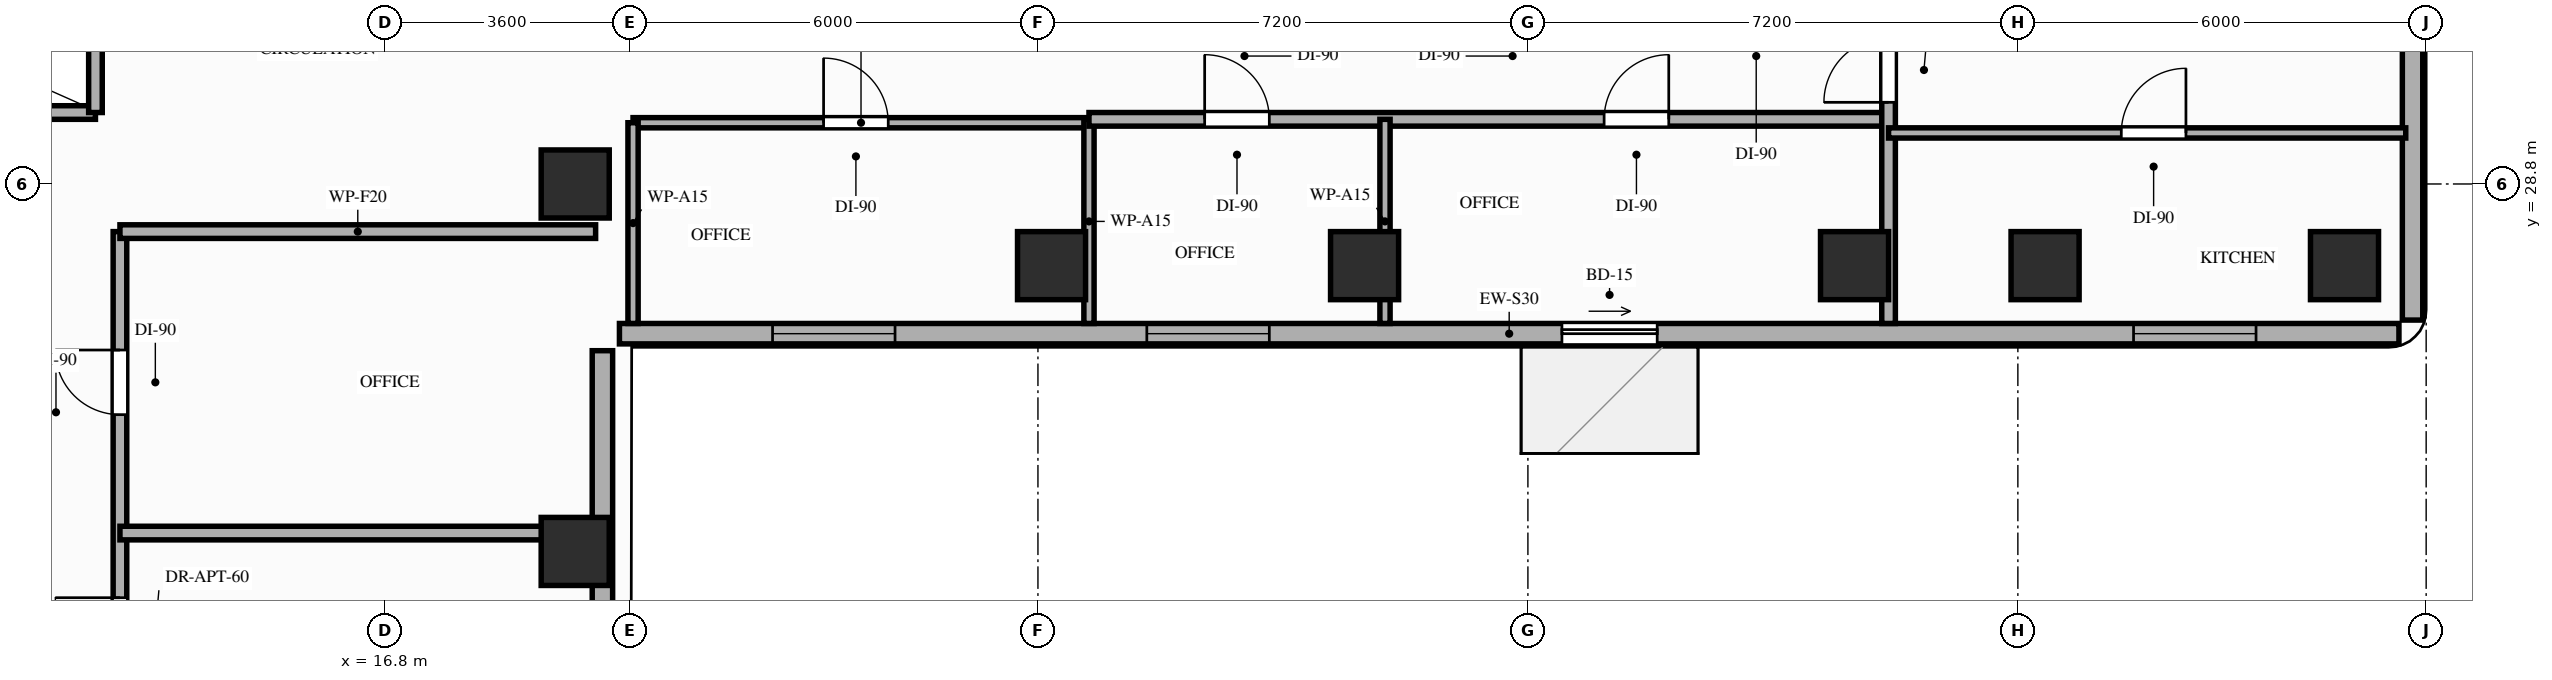
"""IFC4 building model, lengths in metres.
Left out: names, types, materials, properties, quantities, classifications, styles, units other than length and angle.
Written with IfcOpenShell. Run it as: python <this file> out.ifc"""

import sys

from ifc_helpers import new_model, si_unit, direction, frame, frame_2d, origin, origin_2d, place, context, subcontext, project, spatial, rectangle, extrude, element, fill, save


model = new_model("IFC4")
c1 = context("Model", 3, precision=1e-05, world=origin(), true_north=direction((0.0, 1.0)))
c2 = subcontext(c1, "Body", "Model", "MODEL_VIEW")
j1 = project(units=[si_unit("LENGTHUNIT", "METRE"), si_unit("PLANEANGLEUNIT", "RADIAN")], contexts=[c1])
p1 = place(None, origin())
s1 = spatial("IfcSite", under=j1, at=p1, CompositionType="ELEMENT")
p2 = place(p1, origin())
s2 = spatial("IfcBuilding", under=s1, at=p2, CompositionType="ELEMENT")
p3 = place(p2, frame((0.0, 0.0, 107.4)))
s3 = spatial("IfcBuildingStorey", under=s2, at=p3, CompositionType="ELEMENT", Elevation=107.4)
for number, where, z_axis, x_axis in (
    (1, (19.6, 23.4, 0.0), (0.0, 0.0, 1.0), (1.0, 0.0, 0.0)),
    (2, (19.6, 28.8, 0.0), (0.0, 0.0, 1.0), (1.0, 0.0, 0.0)),
    (3, (26.6, 27.6, 0.0), (0.0, 0.0, 1.0), (1.0, 0.0, 0.0)),
    (4, (31.2, 27.6, 0.0), (0.0, 0.0, 1.0), (1.0, 0.0, 0.0)),
    (5, (38.4, 27.6, 0.0), (0.0, 0.0, 1.0), (1.0, 0.0, 0.0)),
    (6, (41.2, 27.6, 0.0), (0.0, 0.0, 1.0), (1.0, 0.0, 0.0)),
    (7, (45.6, 27.6, 0.0), (0.0, 0.0, 1.0), (1.0, 0.0, 0.0)),
):
    element("IfcColumn", number, at=place(p3, frame(where, z_axis=z_axis, x_axis=x_axis)), inside=s3, PredefinedType="COLUMN", context=c2, shape_type="SweptSolid", body=[
        extrude(rectangle(XDim=1.0, YDim=1.0, at=origin_2d()), origin(), (0.0, 0.0, 1.0), 3.2),
    ])
p4 = place(p3, frame((20.0, 8.8, 0.0), z_axis=(0.0, 0.0, 1.0), x_axis=(0.0, 1.0, 0.0)))
e8 = element("IfcWall", 8, at=p4, inside=s3, PredefinedType="STANDARD", context=c2, shape_type="SweptSolid", body=[
    extrude(rectangle(XDim=17.55, YDim=0.3, at=frame_2d((8.775, 0.0))), origin(), (0.0, 0.0, 1.0), 2.41),
])
p5 = place(p4, frame((11.2, 0.0, 0.85)))
e9 = element("IfcOpeningElement", 9, at=p5, cuts=e8, PredefinedType="OPENING", context=c2, shape_type="SweptSolid", body=[
    extrude(rectangle(XDim=1.8, YDim=1.31, at=frame_2d((0.9, 0.655))), frame((0.0, 0.16, 0.0), z_axis=(0.0, -1.0, 0.0), x_axis=(1.0, 0.0, 0.0)), (0.0, 0.0, 1.0), 0.32),
])
p6 = place(p4, frame((5.95, 0.0, 0.85)))
e10 = element("IfcOpeningElement", 10, at=p6, cuts=e8, PredefinedType="OPENING", context=c2, shape_type="SweptSolid", body=[
    extrude(rectangle(XDim=1.8, YDim=1.31, at=frame_2d((0.9, 0.655))), frame((0.0, 0.16, 0.0), z_axis=(0.0, -1.0, 0.0), x_axis=(1.0, 0.0, 0.0)), (0.0, 0.0, 1.0), 0.32),
])
p7 = place(p3, frame((20.25, 26.6, 0.0), z_axis=(0.0, 0.0, 1.0), x_axis=(1.0, 0.0, 0.0)))
e11 = element("IfcWall", 11, at=p7, inside=s3, PredefinedType="STANDARD", context=c2, shape_type="SweptSolid", body=[
    extrude(rectangle(XDim=26.15, YDim=0.3, at=frame_2d((13.075, 0.0))), origin(), (0.0, 0.0, 1.0), 2.71),
])
p8 = place(p7, frame((13.85, 0.0, 0.0)))
e12 = element("IfcOpeningElement", 12, at=p8, cuts=e11, PredefinedType="OPENING", context=c2, shape_type="SweptSolid", body=[
    extrude(rectangle(XDim=1.4, YDim=2.1, at=frame_2d((0.7, 1.05))), frame((0.0, 0.16, 0.0), z_axis=(0.0, -1.0, 0.0), x_axis=(1.0, 0.0, 0.0)), (0.0, 0.0, 1.0), 0.32),
])
p9 = place(p7, frame((2.25, 0.0, 0.85)))
e13 = element("IfcOpeningElement", 13, at=p9, cuts=e11, PredefinedType="OPENING", context=c2, shape_type="SweptSolid", body=[
    extrude(rectangle(XDim=1.8, YDim=1.61, at=frame_2d((0.9, 0.805))), frame((0.0, 0.16, 0.0), z_axis=(0.0, -1.0, 0.0), x_axis=(1.0, 0.0, 0.0)), (0.0, 0.0, 1.0), 0.32),
])
p10 = place(p7, frame((7.75, 0.0, 0.85)))
e14 = element("IfcOpeningElement", 14, at=p10, cuts=e11, PredefinedType="OPENING", context=c2, shape_type="SweptSolid", body=[
    extrude(rectangle(XDim=1.8, YDim=1.61, at=frame_2d((0.9, 0.805))), frame((0.0, 0.16, 0.0), z_axis=(0.0, -1.0, 0.0), x_axis=(1.0, 0.0, 0.0)), (0.0, 0.0, 1.0), 0.32),
])
p11 = place(p7, frame((22.25, 0.0, 0.85)))
e15 = element("IfcOpeningElement", 15, at=p11, cuts=e11, PredefinedType="OPENING", context=c2, shape_type="SweptSolid", body=[
    extrude(rectangle(XDim=1.8, YDim=1.61, at=frame_2d((0.9, 0.805))), frame((0.0, 0.16, 0.0), z_axis=(0.0, -1.0, 0.0), x_axis=(1.0, 0.0, 0.0)), (0.0, 0.0, 1.0), 0.32),
])
p12 = place(p3, frame((46.6, 26.8, 0.0), z_axis=(0.0, 0.0, 1.0), x_axis=(0.0, 1.0, 0.0)))
e16 = element("IfcWall", 16, at=p12, inside=s3, PredefinedType="STANDARD", context=c2, shape_type="SweptSolid", body=[
    extrude(rectangle(XDim=15.35, YDim=0.3, at=frame_2d((7.675, 0.0))), origin(), (0.0, 0.0, 1.0), 3.02),
])
p13 = place(p12, frame((6.13, 0.0, 0.85)))
e17 = element("IfcOpeningElement", 17, at=p13, cuts=e16, PredefinedType="OPENING", context=c2, shape_type="SweptSolid", body=[
    extrude(rectangle(XDim=1.8, YDim=1.75, at=frame_2d((0.9, 0.875))), frame((0.0, 0.16, 0.0), z_axis=(0.0, -1.0, 0.0), x_axis=(1.0, 0.0, 0.0)), (0.0, 0.0, 1.0), 0.32),
])
p14 = place(p3, frame((7.0, 29.85, 0.0), z_axis=(0.0, 0.0, 1.0), x_axis=(1.0, 0.0, 0.0)))
e18 = element("IfcWall", 18, at=p14, inside=s3, PredefinedType="MOVABLE", context=c2, shape_type="SweptSolid", body=[
    extrude(rectangle(XDim=5.55, YDim=0.2, at=frame_2d((2.775, 0.0))), origin(), (0.0, 0.0, 1.0), 3.02),
])
p15 = place(p3, frame((12.55, 29.85, 0.0), z_axis=(0.0, 0.0, 1.0), x_axis=(0.0, 1.0, 0.0)))
e19 = element("IfcWall", 19, at=p15, inside=s3, PredefinedType="MOVABLE", context=c2, shape_type="SweptSolid", body=[
    extrude(rectangle(XDim=2.5, YDim=0.2, at=frame_2d((1.25, 0.0))), origin(), (0.0, 0.0, 1.0), 3.02),
])
p16 = place(p3, frame((12.91, 14.5, 0.0), z_axis=(0.0, 0.0, 1.0), x_axis=(0.0, 1.0, 0.0)))
e20 = element("IfcWall", 20, at=p16, inside=s3, PredefinedType="PARTITIONING", context=c2, shape_type="SweptSolid", body=[
    extrude(rectangle(XDim=13.6, YDim=0.2, at=frame_2d((6.8, 0.0))), origin(), (0.0, 0.0, 1.0), 2.41),
])
p17 = place(p16, frame((0.45, 0.0, 0.0)))
e21 = element("IfcOpeningElement", 21, at=p17, cuts=e20, PredefinedType="OPENING", context=c2, shape_type="SweptSolid", body=[
    extrude(rectangle(XDim=0.95, YDim=2.15, at=frame_2d((0.475, 1.075))), frame((0.0, 0.11, 0.0), z_axis=(0.0, -1.0, 0.0), x_axis=(1.0, 0.0, 0.0)), (0.0, 0.0, 1.0), 0.22),
])
p18 = place(p16, frame((2.75, 0.0, 0.0)))
e22 = element("IfcOpeningElement", 22, at=p18, cuts=e20, PredefinedType="OPENING", context=c2, shape_type="SweptSolid", body=[
    extrude(rectangle(XDim=0.95, YDim=2.1, at=frame_2d((0.475, 1.05))), frame((0.0, 0.11, 0.0), z_axis=(0.0, -1.0, 0.0), x_axis=(1.0, 0.0, 0.0)), (0.0, 0.0, 1.0), 0.22),
])
p19 = place(p16, frame((10.91, 0.0, 0.0)))
e23 = element("IfcOpeningElement", 23, at=p19, cuts=e20, PredefinedType="OPENING", context=c2, shape_type="SweptSolid", body=[
    extrude(rectangle(XDim=0.95, YDim=2.15, at=frame_2d((0.475, 1.075))), frame((0.0, 0.11, 0.0), z_axis=(0.0, -1.0, 0.0), x_axis=(1.0, 0.0, 0.0)), (0.0, 0.0, 1.0), 0.22),
])
p20 = place(p16, frame((7.27, 0.0, 0.0)))
e24 = element("IfcOpeningElement", 24, at=p20, cuts=e20, PredefinedType="OPENING", context=c2, shape_type="SweptSolid", body=[
    extrude(rectangle(XDim=0.95, YDim=2.15, at=frame_2d((0.475, 1.075))), frame((0.0, 0.11, 0.0), z_axis=(0.0, -1.0, 0.0), x_axis=(1.0, 0.0, 0.0)), (0.0, 0.0, 1.0), 0.22),
])
p21 = place(p3, frame((12.91, 28.1, 0.0), z_axis=(0.0, 0.0, 1.0), x_axis=(1.0, 0.0, 0.0)))
e25 = element("IfcWall", 25, at=p21, inside=s3, PredefinedType="PARTITIONING", context=c2, shape_type="SweptSolid", body=[
    extrude(rectangle(XDim=6.99, YDim=0.2, at=frame_2d((3.495, 0.0))), origin(), (0.0, 0.0, 1.0), 2.41),
])
p22 = place(p3, frame((20.45, 29.7, 0.0), z_axis=(0.0, 0.0, 1.0), x_axis=(1.0, 0.0, 0.0)))
e26 = element("IfcWall", 26, at=p22, inside=s3, PredefinedType="PARTITIONING", context=c2, shape_type="SweptSolid", body=[
    extrude(rectangle(XDim=6.7, YDim=0.15, at=frame_2d((3.35, 0.0))), origin(), (0.0, 0.0, 1.0), 3.02),
])
p23 = place(p22, frame((2.8, 0.0, 0.0)))
e27 = element("IfcOpeningElement", 27, at=p23, cuts=e26, PredefinedType="OPENING", context=c2, shape_type="SweptSolid", body=[
    extrude(rectangle(XDim=0.95, YDim=2.15, at=frame_2d((0.475, 1.075))), frame((0.0, 0.085, 0.0), z_axis=(0.0, -1.0, 0.0), x_axis=(1.0, 0.0, 0.0)), (0.0, 0.0, 1.0), 0.17),
])
p24 = place(p3, frame((20.45, 26.75, 0.0), z_axis=(0.0, 0.0, 1.0), x_axis=(0.0, 1.0, 0.0)))
e28 = element("IfcWall", 28, at=p24, inside=s3, PredefinedType="PARTITIONING", context=c2, shape_type="SweptSolid", body=[
    extrude(rectangle(XDim=2.95, YDim=0.15, at=frame_2d((1.475, 0.0))), origin(), (0.0, 0.0, 1.0), 2.41),
])
p25 = place(p3, frame((27.15, 26.75, 0.0), z_axis=(0.0, 0.0, 1.0), x_axis=(0.0, 1.0, 0.0)))
e29 = element("IfcWall", 29, at=p25, inside=s3, PredefinedType="PARTITIONING", context=c2, shape_type="SweptSolid", body=[
    extrude(rectangle(XDim=3.0, YDim=0.15, at=frame_2d((1.5, 0.0))), origin(), (0.0, 0.0, 1.0), 2.41),
])
p26 = place(p3, frame((12.91, 23.67, 0.0), z_axis=(0.0, 0.0, 1.0), x_axis=(1.0, 0.0, 0.0)))
e30 = element("IfcWall", 30, at=p26, inside=s3, PredefinedType="PARTITIONING", context=c2, shape_type="SweptSolid", body=[
    extrude(rectangle(XDim=6.99, YDim=0.2, at=frame_2d((3.495, 0.0))), origin(), (0.0, 0.0, 1.0), 2.41),
])
p27 = place(p3, frame((27.15, 29.75, 0.0), z_axis=(0.0, 0.0, 1.0), x_axis=(1.0, 0.0, 0.0)))
e31 = element("IfcWall", 31, at=p27, inside=s3, PredefinedType="PARTITIONING", context=c2, shape_type="SweptSolid", body=[
    extrude(rectangle(XDim=11.75, YDim=0.2, at=frame_2d((5.875, 0.0))), origin(), (0.0, 0.0, 1.0), 2.41),
])
p28 = place(p27, frame((1.7, 0.0, 0.0)))
e32 = element("IfcOpeningElement", 32, at=p28, cuts=e31, PredefinedType="OPENING", context=c2, shape_type="SweptSolid", body=[
    extrude(rectangle(XDim=0.95, YDim=2.15, at=frame_2d((0.475, 1.075))), frame((0.0, 0.11, 0.0), z_axis=(0.0, -1.0, 0.0), x_axis=(1.0, 0.0, 0.0)), (0.0, 0.0, 1.0), 0.22),
])
p29 = place(p27, frame((7.57, 0.0, 0.0)))
e33 = element("IfcOpeningElement", 33, at=p29, cuts=e31, PredefinedType="OPENING", context=c2, shape_type="SweptSolid", body=[
    extrude(rectangle(XDim=0.95, YDim=2.15, at=frame_2d((0.475, 1.075))), frame((0.0, 0.11, 0.0), z_axis=(0.0, -1.0, 0.0), x_axis=(1.0, 0.0, 0.0)), (0.0, 0.0, 1.0), 0.22),
])
p30 = place(p3, frame((38.9, 26.75, 0.0), z_axis=(0.0, 0.0, 1.0), x_axis=(0.0, 1.0, 0.0)))
e34 = element("IfcWall", 34, at=p30, inside=s3, PredefinedType="PARTITIONING", context=c2, shape_type="SweptSolid", body=[
    extrude(rectangle(XDim=15.45, YDim=0.2, at=frame_2d((7.725, 0.0))), origin(), (0.0, 0.0, 1.0), 2.41),
])
p31 = place(p30, frame((3.25, 0.0, 0.0)))
e35 = element("IfcOpeningElement", 35, at=p31, cuts=e34, PredefinedType="OPENING", context=c2, shape_type="SweptSolid", body=[
    extrude(rectangle(XDim=0.95, YDim=2.15, at=frame_2d((0.475, 1.075))), frame((0.0, 0.11, 0.0), z_axis=(0.0, -1.0, 0.0), x_axis=(1.0, 0.0, 0.0)), (0.0, 0.0, 1.0), 0.22),
])
p32 = place(p3, frame((38.9, 29.55, 0.0), z_axis=(0.0, 0.0, 1.0), x_axis=(1.0, 0.0, 0.0)))
e36 = element("IfcWall", 36, at=p32, inside=s3, PredefinedType="PARTITIONING", context=c2, shape_type="SweptSolid", body=[
    extrude(rectangle(XDim=7.6, YDim=0.15, at=frame_2d((3.8, 0.0))), origin(), (0.0, 0.0, 1.0), 2.41),
])
p33 = place(p32, frame((3.42, 0.0, 0.0)))
e37 = element("IfcOpeningElement", 37, at=p33, cuts=e36, PredefinedType="OPENING", context=c2, shape_type="SweptSolid", body=[
    extrude(rectangle(XDim=0.95, YDim=2.15, at=frame_2d((0.475, 1.075))), frame((0.0, 0.085, 0.0), z_axis=(0.0, -1.0, 0.0), x_axis=(1.0, 0.0, 0.0)), (0.0, 0.0, 1.0), 0.17),
])
p34 = place(p3, frame((31.5, 26.75, 0.0), z_axis=(0.0, 0.0, 1.0), x_axis=(0.0, 1.0, 0.0)))
e38 = element("IfcWall", 38, at=p34, inside=s3, PredefinedType="PARTITIONING", context=c2, shape_type="SweptSolid", body=[
    extrude(rectangle(XDim=3.0, YDim=0.15, at=frame_2d((1.5, 0.0))), origin(), (0.0, 0.0, 1.0), 2.41),
])
p35 = place(p8, origin())
e39 = element("IfcDoor", 39, at=p35, inside=s3, OperationType="SLIDING_TO_RIGHT", PredefinedType="DOOR", context=c2, shape_type="SweptSolid", body=[
    extrude(rectangle(XDim=1.4, YDim=2.1, at=frame_2d((0.7, 1.05))), frame((0.0, 0.025, 0.0), z_axis=(0.0, -1.0, 0.0), x_axis=(1.0, 0.0, 0.0)), (0.0, 0.0, 1.0), 0.05),
])
fill(e12, e39)
p36 = place(p9, origin())
e40 = element("IfcWindow", 40, at=p36, inside=s3, PartitioningType="SINGLE_PANEL", PredefinedType="WINDOW", context=c2, shape_type="SweptSolid", body=[
    extrude(rectangle(XDim=1.8, YDim=1.61, at=frame_2d((0.9, 0.805))), frame((0.0, 0.03, 0.0), z_axis=(0.0, -1.0, 0.0), x_axis=(1.0, 0.0, 0.0)), (0.0, 0.0, 1.0), 0.06),
])
fill(e13, e40)
p37 = place(p10, origin())
e41 = element("IfcWindow", 41, at=p37, inside=s3, PartitioningType="SINGLE_PANEL", PredefinedType="WINDOW", context=c2, shape_type="SweptSolid", body=[
    extrude(rectangle(XDim=1.8, YDim=1.61, at=frame_2d((0.9, 0.805))), frame((0.0, 0.03, 0.0), z_axis=(0.0, -1.0, 0.0), x_axis=(1.0, 0.0, 0.0)), (0.0, 0.0, 1.0), 0.06),
])
fill(e14, e41)
p38 = place(p11, origin())
e42 = element("IfcWindow", 42, at=p38, inside=s3, PartitioningType="SINGLE_PANEL", PredefinedType="WINDOW", context=c2, shape_type="SweptSolid", body=[
    extrude(rectangle(XDim=1.8, YDim=1.61, at=frame_2d((0.9, 0.805))), frame((0.0, 0.03, 0.0), z_axis=(0.0, -1.0, 0.0), x_axis=(1.0, 0.0, 0.0)), (0.0, 0.0, 1.0), 0.06),
])
fill(e15, e42)
p39 = place(p23, origin())
e43 = element("IfcDoor", 43, at=p39, inside=s3, OperationType="SINGLE_SWING_LEFT", PredefinedType="DOOR", context=c2, shape_type="SweptSolid", body=[
    extrude(rectangle(XDim=0.95, YDim=2.15, at=frame_2d((0.475, 1.075))), frame((0.0, 0.025, 0.0), z_axis=(0.0, -1.0, 0.0), x_axis=(1.0, 0.0, 0.0)), (0.0, 0.0, 1.0), 0.05),
])
fill(e27, e43)
p40 = place(p19, origin())
e44 = element("IfcDoor", 44, at=p40, inside=s3, OperationType="SINGLE_SWING_RIGHT", PredefinedType="DOOR", context=c2, shape_type="SweptSolid", body=[
    extrude(rectangle(XDim=0.95, YDim=2.15, at=frame_2d((0.475, 1.075))), frame((0.0, 0.025, 0.0), z_axis=(0.0, -1.0, 0.0), x_axis=(1.0, 0.0, 0.0)), (0.0, 0.0, 1.0), 0.05),
])
fill(e23, e44)
p41 = place(p20, origin())
e45 = element("IfcDoor", 45, at=p41, inside=s3, OperationType="SINGLE_SWING_RIGHT", PredefinedType="DOOR", context=c2, shape_type="SweptSolid", body=[
    extrude(rectangle(XDim=0.95, YDim=2.15, at=frame_2d((0.475, 1.075))), frame((0.0, 0.025, 0.0), z_axis=(0.0, -1.0, 0.0), x_axis=(1.0, 0.0, 0.0)), (0.0, 0.0, 1.0), 0.05),
])
fill(e24, e45)
p42 = place(p31, origin())
e46 = element("IfcDoor", 46, at=p42, inside=s3, OperationType="SINGLE_SWING_LEFT", PredefinedType="DOOR", context=c2, shape_type="SweptSolid", body=[
    extrude(rectangle(XDim=0.95, YDim=2.15, at=frame_2d((0.475, 1.075))), frame((0.0, 0.025, 0.0), z_axis=(0.0, -1.0, 0.0), x_axis=(1.0, 0.0, 0.0)), (0.0, 0.0, 1.0), 0.05),
])
fill(e35, e46)
p43 = place(p33, origin())
e47 = element("IfcDoor", 47, at=p43, inside=s3, OperationType="SINGLE_SWING_RIGHT", PredefinedType="DOOR", context=c2, shape_type="SweptSolid", body=[
    extrude(rectangle(XDim=0.95, YDim=2.15, at=frame_2d((0.475, 1.075))), frame((0.0, 0.025, 0.0), z_axis=(0.0, -1.0, 0.0), x_axis=(1.0, 0.0, 0.0)), (0.0, 0.0, 1.0), 0.05),
])
fill(e37, e47)
p44 = place(p28, origin())
e48 = element("IfcDoor", 48, at=p44, inside=s3, OperationType="SINGLE_SWING_LEFT", PredefinedType="DOOR", context=c2, shape_type="SweptSolid", body=[
    extrude(rectangle(XDim=0.95, YDim=2.15, at=frame_2d((0.475, 1.075))), frame((0.0, 0.025, 0.0), z_axis=(0.0, -1.0, 0.0), x_axis=(1.0, 0.0, 0.0)), (0.0, 0.0, 1.0), 0.05),
])
fill(e32, e48)
p45 = place(p29, origin())
e49 = element("IfcDoor", 49, at=p45, inside=s3, OperationType="SINGLE_SWING_RIGHT", PredefinedType="DOOR", context=c2, shape_type="SweptSolid", body=[
    extrude(rectangle(XDim=0.95, YDim=2.15, at=frame_2d((0.475, 1.075))), frame((0.0, 0.025, 0.0), z_axis=(0.0, -1.0, 0.0), x_axis=(1.0, 0.0, 0.0)), (0.0, 0.0, 1.0), 0.05),
])
fill(e33, e49)
save(model, sys.argv[1])
